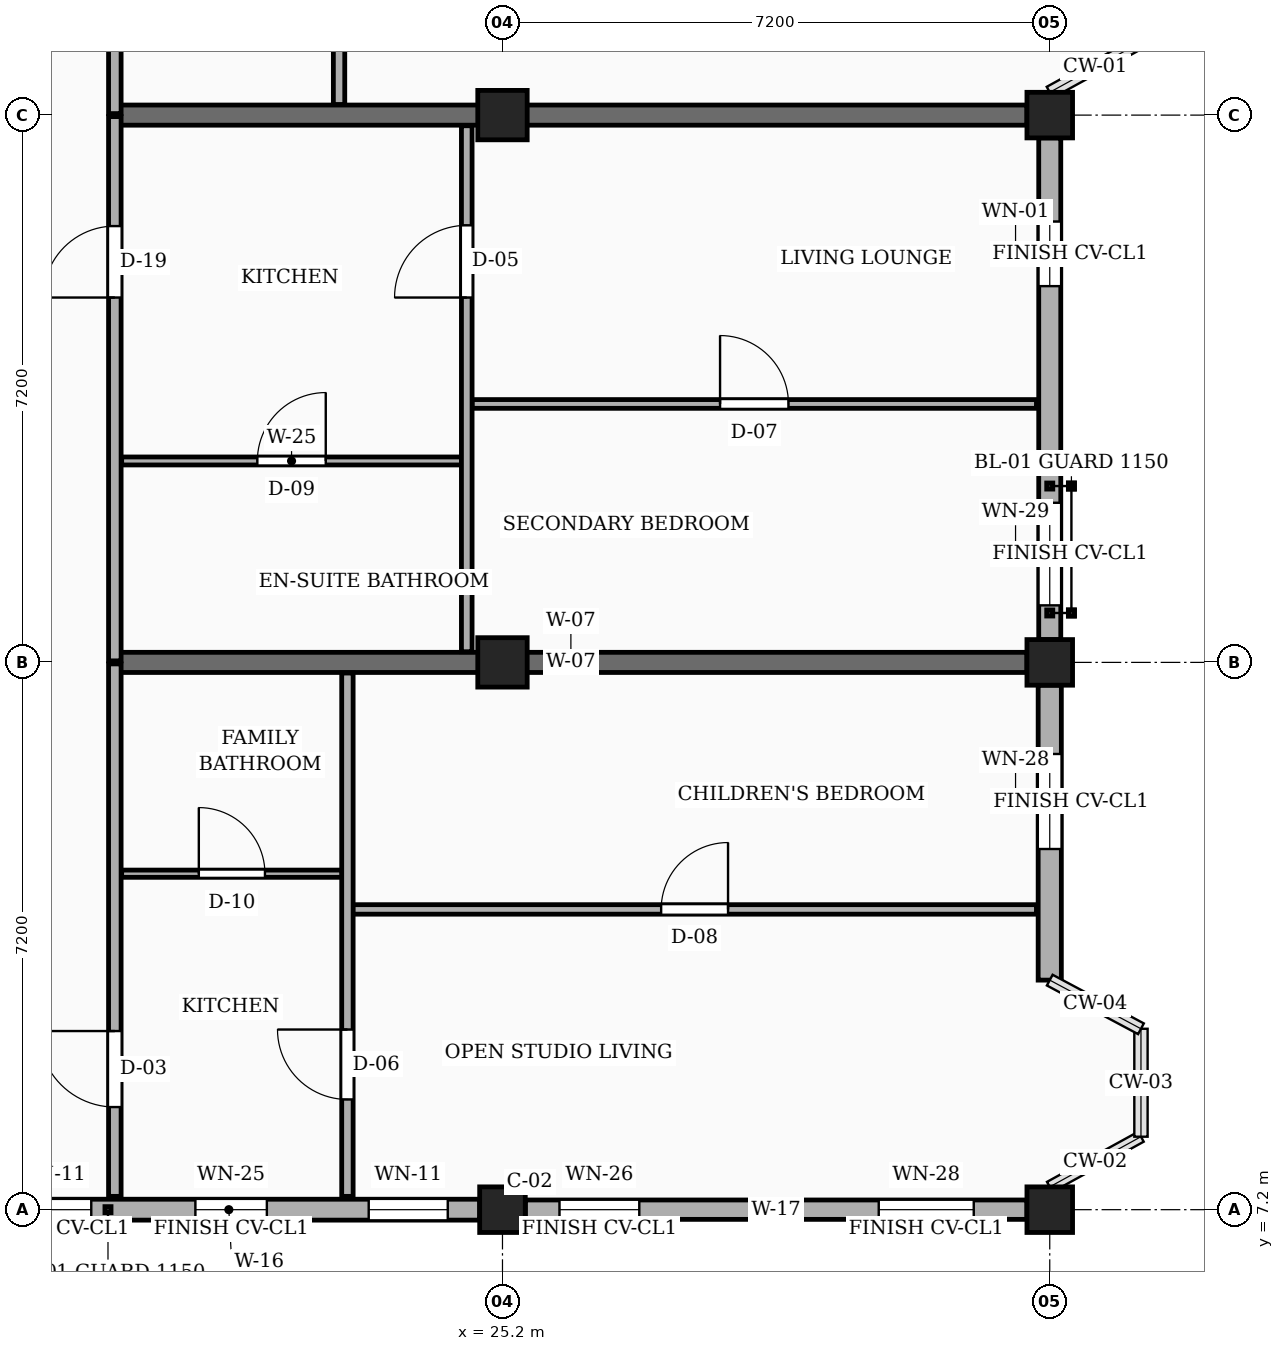
"""IFC4 building model, lengths in metres.
Left out: names, types, materials, properties, quantities, classifications, styles, units other than length and angle.
Written with IfcOpenShell. Run it as: python <this file> out.ifc"""

import sys

from ifc_helpers import new_model, si_unit, direction, frame, frame_2d, origin, origin_2d, place, context, subcontext, project, spatial, rectangle, extrude, element, fill, save


model = new_model("IFC4")
c1 = context("Model", 3, precision=1e-05, world=origin(), true_north=direction((0.0, 1.0)))
c2 = subcontext(c1, "Body", "Model", "MODEL_VIEW")
j1 = project(units=[si_unit("LENGTHUNIT", "METRE"), si_unit("PLANEANGLEUNIT", "RADIAN")], contexts=[c1])
p1 = place(None, origin())
s1 = spatial("IfcSite", under=j1, at=p1, CompositionType="ELEMENT")
p2 = place(p1, origin())
s2 = spatial("IfcBuilding", under=s1, at=p2, CompositionType="ELEMENT")
p3 = place(p2, frame((0.0, 0.0, 7.65)))
s3 = spatial("IfcBuildingStorey", under=s2, at=p3, CompositionType="ELEMENT", Elevation=7.65)
p4 = place(p3, frame((25.2, 7.2, 0.0), z_axis=(0.0, 0.0, 1.0), x_axis=(1.0, 0.0, 0.0)))
e1 = element("IfcColumn", 1, at=p4, inside=s3, PredefinedType="COLUMN", context=c2, shape_type="SweptSolid", body=[
    extrude(rectangle(XDim=0.6, YDim=0.6, at=origin_2d()), origin(), (0.0, 0.0, 1.0), 3.15),
])
for number, where, z_axis, x_axis in (
    (2, (25.2, 14.4, 0.0), (0.0, 0.0, 1.0), (1.0, 0.0, 0.0)),
    (3, (25.2, 21.6, 0.0), (0.0, 0.0, 1.0), (1.0, 0.0, 0.0)),
):
    element("IfcColumn", number, at=place(p3, frame(where, z_axis=z_axis, x_axis=x_axis)), inside=s3, PredefinedType="COLUMN", context=c2, shape_type="SweptSolid", body=[
        extrude(rectangle(XDim=0.65, YDim=0.65, at=origin_2d()), origin(), (0.0, 0.0, 1.0), 3.15),
    ])
for number, where, z_axis, x_axis in (
    (4, (32.4, 7.2, 0.0), (0.0, 0.0, 1.0), (1.0, 0.0, 0.0)),
    (5, (32.4, 14.4, 0.0), (0.0, 0.0, 1.0), (1.0, 0.0, 0.0)),
    (6, (32.4, 21.6, 0.0), (0.0, 0.0, 1.0), (1.0, 0.0, 0.0)),
):
    element("IfcColumn", number, at=place(p3, frame(where, z_axis=z_axis, x_axis=x_axis)), inside=s3, PredefinedType="COLUMN", context=c2, shape_type="SweptSolid", body=[
        extrude(rectangle(XDim=0.6, YDim=0.6, at=origin_2d()), origin(), (0.0, 0.0, 1.0), 3.15),
    ])
for number, where, z_axis, x_axis in (
    (7, (20.1, 14.4, 0.0), (0.0, 0.0, 1.0), (1.0, 0.0, 0.0)),
    (8, (20.1, 21.6, 0.0), (0.0, 0.0, 1.0), (1.0, 0.0, 0.0)),
):
    element("IfcWall", number, at=place(p3, frame(where, z_axis=z_axis, x_axis=x_axis)), inside=s3, PredefinedType="SOLIDWALL", context=c2, shape_type="SweptSolid", body=[
        extrude(rectangle(XDim=12.0, YDim=0.265, at=frame_2d((6.0, 0.0))), origin(), (0.0, 0.0, 1.0), 2.17),
    ])
p5 = place(p3, frame((18.3, 7.2, 0.0), z_axis=(0.0, 0.0, 1.0), x_axis=(1.0, 0.0, 0.0)))
e9 = element("IfcWall", 9, at=p5, inside=s3, PredefinedType="SOLIDWALL", context=c2, shape_type="SweptSolid", body=[
    extrude(rectangle(XDim=6.6, YDim=0.275, at=frame_2d((3.3, 0.0))), origin(), (0.0, 0.0, 1.0), 2.44),
])
p6 = place(p5, frame((0.45, 0.0, 0.78)))
e10 = element("IfcOpeningElement", 10, at=p6, cuts=e9, PredefinedType="OPENING", context=c2, shape_type="SweptSolid", body=[
    extrude(rectangle(XDim=1.04, YDim=1.26, at=frame_2d((0.52, 0.63))), frame((0.0, 0.147, 0.0), z_axis=(0.0, -1.0, 0.0), x_axis=(1.0, 0.0, 0.0)), (0.0, 0.0, 1.0), 0.295),
])
p7 = place(p5, frame((2.86, 0.0, 0.78)))
e11 = element("IfcOpeningElement", 11, at=p7, cuts=e9, PredefinedType="OPENING", context=c2, shape_type="SweptSolid", body=[
    extrude(rectangle(XDim=0.94, YDim=1.44, at=frame_2d((0.47, 0.72))), frame((0.0, 0.147, 0.0), z_axis=(0.0, -1.0, 0.0), x_axis=(1.0, 0.0, 0.0)), (0.0, 0.0, 1.0), 0.295),
])
p8 = place(p5, frame((5.14, 0.0, 0.78)))
e12 = element("IfcOpeningElement", 12, at=p8, cuts=e9, PredefinedType="OPENING", context=c2, shape_type="SweptSolid", body=[
    extrude(rectangle(XDim=1.04, YDim=1.26, at=frame_2d((0.52, 0.63))), frame((0.0, 0.147, 0.0), z_axis=(0.0, -1.0, 0.0), x_axis=(1.0, 0.0, 0.0)), (0.0, 0.0, 1.0), 0.295),
])
p9 = place(p3, frame((25.5, 7.2, 0.0), z_axis=(0.0, 0.0, 1.0), x_axis=(1.0, 0.0, 0.0)))
e13 = element("IfcWall", 13, at=p9, inside=s3, PredefinedType="SOLIDWALL", context=c2, shape_type="SweptSolid", body=[
    extrude(rectangle(XDim=6.6, YDim=0.255, at=frame_2d((3.3, 0.0))), origin(), (0.0, 0.0, 1.0), 2.44),
])
p10 = place(p9, frame((0.45, 0.0, 0.78)))
e14 = element("IfcOpeningElement", 14, at=p10, cuts=e13, PredefinedType="OPENING", context=c2, shape_type="SweptSolid", body=[
    extrude(rectangle(XDim=1.05, YDim=1.44, at=frame_2d((0.525, 0.72))), frame((0.0, 0.137, 0.0), z_axis=(0.0, -1.0, 0.0), x_axis=(1.0, 0.0, 0.0)), (0.0, 0.0, 1.0), 0.275),
])
p11 = place(p9, frame((4.65, 0.0, 0.78)))
e15 = element("IfcOpeningElement", 15, at=p11, cuts=e13, PredefinedType="OPENING", context=c2, shape_type="SweptSolid", body=[
    extrude(rectangle(XDim=1.25, YDim=1.44, at=frame_2d((0.625, 0.72))), frame((0.0, 0.137, 0.0), z_axis=(0.0, -1.0, 0.0), x_axis=(1.0, 0.0, 0.0)), (0.0, 0.0, 1.0), 0.275),
])
p12 = place(p3, frame((32.4, 10.22, 0.0), z_axis=(0.0, 0.0, 1.0), x_axis=(0.0, 1.0, 0.0)))
e16 = element("IfcWall", 16, at=p12, inside=s3, PredefinedType="SOLIDWALL", context=c2, shape_type="SweptSolid", body=[
    extrude(rectangle(XDim=3.88, YDim=0.305, at=frame_2d((1.94, 0.0))), origin(), (0.0, 0.0, 1.0), 2.44),
])
p13 = place(p12, frame((1.725, 0.0, 0.78)))
e17 = element("IfcOpeningElement", 17, at=p13, cuts=e16, PredefinedType="OPENING", context=c2, shape_type="SweptSolid", body=[
    extrude(rectangle(XDim=1.25, YDim=1.44, at=frame_2d((0.625, 0.72))), frame((0.0, 0.163, 0.0), z_axis=(0.0, -1.0, 0.0), x_axis=(1.0, 0.0, 0.0)), (0.0, 0.0, 1.0), 0.325),
])
p14 = place(p3, frame((32.4, 14.7, 0.0), z_axis=(0.0, 0.0, 1.0), x_axis=(0.0, 1.0, 0.0)))
e18 = element("IfcWall", 18, at=p14, inside=s3, PredefinedType="SOLIDWALL", context=c2, shape_type="SweptSolid", body=[
    extrude(rectangle(XDim=6.6, YDim=0.29, at=frame_2d((3.3, 0.0))), origin(), (0.0, 0.0, 1.0), 2.44),
])
p15 = place(p14, frame((0.45, 0.0, 0.78)))
e19 = element("IfcOpeningElement", 19, at=p15, cuts=e18, PredefinedType="OPENING", context=c2, shape_type="SweptSolid", body=[
    extrude(rectangle(XDim=1.35, YDim=1.44, at=frame_2d((0.675, 0.72))), frame((0.0, 0.155, 0.0), z_axis=(0.0, -1.0, 0.0), x_axis=(1.0, 0.0, 0.0)), (0.0, 0.0, 1.0), 0.31),
])
p16 = place(p14, frame((4.65, 0.0, 0.78)))
e20 = element("IfcOpeningElement", 20, at=p16, cuts=e18, PredefinedType="OPENING", context=c2, shape_type="SweptSolid", body=[
    extrude(rectangle(XDim=0.85, YDim=1.15, at=frame_2d((0.425, 0.575))), frame((0.0, 0.155, 0.0), z_axis=(0.0, -1.0, 0.0), x_axis=(1.0, 0.0, 0.0)), (0.0, 0.0, 1.0), 0.31),
])
p17 = place(p3, frame((20.1, 7.375, 0.0), z_axis=(0.0, 0.0, 1.0), x_axis=(0.0, 1.0, 0.0)))
e21 = element("IfcWall", 21, at=p17, inside=s3, PredefinedType="PARTITIONING", context=c2, shape_type="SweptSolid", body=[
    extrude(rectangle(XDim=7.005, YDim=0.165, at=frame_2d((3.502, 0.0))), origin(), (0.0, 0.0, 1.0), 2.305),
])
p18 = place(p17, frame((1.175, 0.0, 0.0)))
e22 = element("IfcOpeningElement", 22, at=p18, cuts=e21, PredefinedType="OPENING", context=c2, shape_type="SweptSolid", body=[
    extrude(rectangle(XDim=1.0, YDim=2.15, at=frame_2d((0.5, 1.075))), frame((0.0, 0.093, 0.0), z_axis=(0.0, -1.0, 0.0), x_axis=(1.0, 0.0, 0.0)), (0.0, 0.0, 1.0), 0.185),
])
p19 = place(p3, frame((20.1, 14.42, 0.0), z_axis=(0.0, 0.0, 1.0), x_axis=(0.0, 1.0, 0.0)))
e23 = element("IfcWall", 23, at=p19, inside=s3, PredefinedType="PARTITIONING", context=c2, shape_type="SweptSolid", body=[
    extrude(rectangle(XDim=7.16, YDim=0.165, at=frame_2d((3.58, 0.0))), origin(), (0.0, 0.0, 1.0), 2.305),
])
p20 = place(p19, frame((4.78, 0.0, 0.0)))
e24 = element("IfcOpeningElement", 24, at=p20, cuts=e23, PredefinedType="OPENING", context=c2, shape_type="SweptSolid", body=[
    extrude(rectangle(XDim=0.94, YDim=2.12, at=frame_2d((0.47, 1.06))), frame((0.0, 0.093, 0.0), z_axis=(0.0, -1.0, 0.0), x_axis=(1.0, 0.0, 0.0)), (0.0, 0.0, 1.0), 0.185),
])
p21 = place(p3, frame((20.1, 21.62, 0.0), z_axis=(0.0, 0.0, 1.0), x_axis=(0.0, 1.0, 0.0)))
e25 = element("IfcWall", 25, at=p21, inside=s3, PredefinedType="PARTITIONING", context=c2, shape_type="SweptSolid", body=[
    extrude(rectangle(XDim=7.16, YDim=0.165, at=frame_2d((3.58, 0.0))), origin(), (0.0, 0.0, 1.0), 2.305),
])
p22 = place(p21, frame((1.33, 0.0, 0.0)))
e26 = element("IfcOpeningElement", 26, at=p22, cuts=e25, PredefinedType="OPENING", context=c2, shape_type="SweptSolid", body=[
    extrude(rectangle(XDim=1.14, YDim=2.18, at=frame_2d((0.57, 1.09))), frame((0.0, 0.093, 0.0), z_axis=(0.0, -1.0, 0.0), x_axis=(1.0, 0.0, 0.0)), (0.0, 0.0, 1.0), 0.185),
])
p23 = place(p3, frame((23.23, 11.15, 0.0), z_axis=(0.0, 0.0, 1.0), x_axis=(1.0, 0.0, 0.0)))
e27 = element("IfcWall", 27, at=p23, inside=s3, PredefinedType="PARTITIONING", context=c2, shape_type="SweptSolid", body=[
    extrude(rectangle(XDim=8.995, YDim=0.125, at=frame_2d((4.498, 0.0))), origin(), (0.0, 0.0, 1.0), 2.305),
])
p24 = place(p23, frame((4.058, 0.0, 0.0)))
e28 = element("IfcOpeningElement", 28, at=p24, cuts=e27, PredefinedType="OPENING", context=c2, shape_type="SweptSolid", body=[
    extrude(rectangle(XDim=0.88, YDim=2.08, at=frame_2d((0.44, 1.04))), frame((0.0, 0.073, 0.0), z_axis=(0.0, -1.0, 0.0), x_axis=(1.0, 0.0, 0.0)), (0.0, 0.0, 1.0), 0.145),
])
p25 = place(p3, frame((20.19, 11.62, 0.0), z_axis=(0.0, 0.0, 1.0), x_axis=(1.0, 0.0, 0.0)))
e29 = element("IfcWall", 29, at=p25, inside=s3, PredefinedType="PARTITIONING", context=c2, shape_type="SweptSolid", body=[
    extrude(rectangle(XDim=2.9, YDim=0.095, at=frame_2d((1.45, 0.0))), origin(), (0.0, 0.0, 1.0), 2.305),
])
p26 = place(p25, frame((1.015, 0.0, 0.0)))
e30 = element("IfcOpeningElement", 30, at=p26, cuts=e29, PredefinedType="OPENING", context=c2, shape_type="SweptSolid", body=[
    extrude(rectangle(XDim=0.87, YDim=2.05, at=frame_2d((0.435, 1.025))), frame((0.0, 0.058, 0.0), z_axis=(0.0, -1.0, 0.0), x_axis=(1.0, 0.0, 0.0)), (0.0, 0.0, 1.0), 0.115),
])
p27 = place(p3, frame((23.16, 7.375, 0.0), z_axis=(0.0, 0.0, 1.0), x_axis=(0.0, 1.0, 0.0)))
e31 = element("IfcWall", 31, at=p27, inside=s3, PredefinedType="PARTITIONING", context=c2, shape_type="SweptSolid", body=[
    extrude(rectangle(XDim=6.885, YDim=0.15, at=frame_2d((3.442, 0.0))), origin(), (0.0, 0.0, 1.0), 2.305),
])
p28 = place(p27, frame((1.275, 0.0, 0.0)))
e32 = element("IfcOpeningElement", 32, at=p28, cuts=e31, PredefinedType="OPENING", context=c2, shape_type="SweptSolid", body=[
    extrude(rectangle(XDim=0.92, YDim=2.1, at=frame_2d((0.46, 1.05))), frame((0.0, 0.085, 0.0), z_axis=(0.0, -1.0, 0.0), x_axis=(1.0, 0.0, 0.0)), (0.0, 0.0, 1.0), 0.17),
])
p29 = place(p3, frame((24.8, 17.8, 0.0), z_axis=(0.0, 0.0, 1.0), x_axis=(1.0, 0.0, 0.0)))
e33 = element("IfcWall", 33, at=p29, inside=s3, PredefinedType="PARTITIONING", context=c2, shape_type="SweptSolid", body=[
    extrude(rectangle(XDim=7.425, YDim=0.115, at=frame_2d((3.712, 0.0))), origin(), (0.0, 0.0, 1.0), 2.305),
])
p30 = place(p29, frame((3.262, 0.0, 0.0)))
e34 = element("IfcOpeningElement", 34, at=p30, cuts=e33, PredefinedType="OPENING", context=c2, shape_type="SweptSolid", body=[
    extrude(rectangle(XDim=0.9, YDim=2.1, at=frame_2d((0.45, 1.05))), frame((0.0, 0.067, 0.0), z_axis=(0.0, -1.0, 0.0), x_axis=(1.0, 0.0, 0.0)), (0.0, 0.0, 1.0), 0.135),
])
p31 = place(p3, frame((20.19, 17.05, 0.0), z_axis=(0.0, 0.0, 1.0), x_axis=(1.0, 0.0, 0.0)))
e35 = element("IfcWall", 35, at=p31, inside=s3, PredefinedType="PARTITIONING", context=c2, shape_type="SweptSolid", body=[
    extrude(rectangle(XDim=4.47, YDim=0.105, at=frame_2d((2.235, 0.0))), origin(), (0.0, 0.0, 1.0), 2.305),
])
p32 = place(p31, frame((1.785, 0.0, 0.0)))
e36 = element("IfcOpeningElement", 36, at=p32, cuts=e35, PredefinedType="OPENING", context=c2, shape_type="SweptSolid", body=[
    extrude(rectangle(XDim=0.9, YDim=2.05, at=frame_2d((0.45, 1.025))), frame((0.0, 0.062, 0.0), z_axis=(0.0, -1.0, 0.0), x_axis=(1.0, 0.0, 0.0)), (0.0, 0.0, 1.0), 0.125),
])
p33 = place(p3, frame((24.73, 14.54, 0.0), z_axis=(0.0, 0.0, 1.0), x_axis=(0.0, 1.0, 0.0)))
e37 = element("IfcWall", 37, at=p33, inside=s3, PredefinedType="PARTITIONING", context=c2, shape_type="SweptSolid", body=[
    extrude(rectangle(XDim=6.92, YDim=0.14, at=frame_2d((3.46, 0.0))), origin(), (0.0, 0.0, 1.0), 2.305),
])
p34 = place(p33, frame((4.66, 0.0, 0.0)))
e38 = element("IfcOpeningElement", 38, at=p34, cuts=e37, PredefinedType="OPENING", context=c2, shape_type="SweptSolid", body=[
    extrude(rectangle(XDim=0.95, YDim=2.1, at=frame_2d((0.475, 1.05))), frame((0.0, 0.08, 0.0), z_axis=(0.0, -1.0, 0.0), x_axis=(1.0, 0.0, 0.0)), (0.0, 0.0, 1.0), 0.16),
])
p35 = place(p3, frame((23.05, 21.74, 0.0), z_axis=(0.0, 0.0, 1.0), x_axis=(0.0, 1.0, 0.0)))
e39 = element("IfcWall", 39, at=p35, inside=s3, PredefinedType="PARTITIONING", context=c2, shape_type="SweptSolid", body=[
    extrude(rectangle(XDim=6.92, YDim=0.15, at=frame_2d((3.46, 0.0))), origin(), (0.0, 0.0, 1.0), 2.305),
])
p36 = place(p35, frame((1.31, 0.0, 0.0)))
e40 = element("IfcOpeningElement", 40, at=p36, cuts=e39, PredefinedType="OPENING", context=c2, shape_type="SweptSolid", body=[
    extrude(rectangle(XDim=0.95, YDim=2.1, at=frame_2d((0.475, 1.05))), frame((0.0, 0.085, 0.0), z_axis=(0.0, -1.0, 0.0), x_axis=(1.0, 0.0, 0.0)), (0.0, 0.0, 1.0), 0.17),
])
p37 = place(p6, origin())
e41 = element("IfcWindow", 41, at=p37, inside=s3, PartitioningType="SINGLE_PANEL", PredefinedType="WINDOW", context=c2, shape_type="SweptSolid", body=[
    extrude(rectangle(XDim=1.04, YDim=1.26, at=frame_2d((0.52, 0.63))), frame((0.0, 0.03, 0.0), z_axis=(0.0, -1.0, 0.0), x_axis=(1.0, 0.0, 0.0)), (0.0, 0.0, 1.0), 0.06),
])
fill(e10, e41)
p38 = place(p7, origin())
e42 = element("IfcWindow", 42, at=p38, inside=s3, PartitioningType="SINGLE_PANEL", PredefinedType="WINDOW", context=c2, shape_type="SweptSolid", body=[
    extrude(rectangle(XDim=0.94, YDim=1.44, at=frame_2d((0.47, 0.72))), frame((0.0, 0.03, 0.0), z_axis=(0.0, -1.0, 0.0), x_axis=(1.0, 0.0, 0.0)), (0.0, 0.0, 1.0), 0.06),
])
fill(e11, e42)
p39 = place(p8, origin())
e43 = element("IfcWindow", 43, at=p39, inside=s3, PartitioningType="SINGLE_PANEL", PredefinedType="WINDOW", context=c2, shape_type="SweptSolid", body=[
    extrude(rectangle(XDim=1.04, YDim=1.26, at=frame_2d((0.52, 0.63))), frame((0.0, 0.03, 0.0), z_axis=(0.0, -1.0, 0.0), x_axis=(1.0, 0.0, 0.0)), (0.0, 0.0, 1.0), 0.06),
])
fill(e12, e43)
p40 = place(p10, origin())
e44 = element("IfcWindow", 44, at=p40, inside=s3, PartitioningType="SINGLE_PANEL", PredefinedType="WINDOW", context=c2, shape_type="SweptSolid", body=[
    extrude(rectangle(XDim=1.05, YDim=1.44, at=frame_2d((0.525, 0.72))), frame((0.0, 0.03, 0.0), z_axis=(0.0, -1.0, 0.0), x_axis=(1.0, 0.0, 0.0)), (0.0, 0.0, 1.0), 0.06),
])
fill(e14, e44)
p41 = place(p11, origin())
e45 = element("IfcWindow", 45, at=p41, inside=s3, PartitioningType="SINGLE_PANEL", PredefinedType="WINDOW", context=c2, shape_type="SweptSolid", body=[
    extrude(rectangle(XDim=1.25, YDim=1.44, at=frame_2d((0.625, 0.72))), frame((0.0, 0.03, 0.0), z_axis=(0.0, -1.0, 0.0), x_axis=(1.0, 0.0, 0.0)), (0.0, 0.0, 1.0), 0.06),
])
fill(e15, e45)
p42 = place(p13, origin())
e46 = element("IfcWindow", 46, at=p42, inside=s3, PartitioningType="SINGLE_PANEL", PredefinedType="WINDOW", context=c2, shape_type="SweptSolid", body=[
    extrude(rectangle(XDim=1.25, YDim=1.44, at=frame_2d((0.625, 0.72))), frame((0.0, 0.03, 0.0), z_axis=(0.0, -1.0, 0.0), x_axis=(1.0, 0.0, 0.0)), (0.0, 0.0, 1.0), 0.06),
])
fill(e17, e46)
p43 = place(p15, origin())
e47 = element("IfcWindow", 47, at=p43, inside=s3, PartitioningType="SINGLE_PANEL", PredefinedType="WINDOW", context=c2, shape_type="SweptSolid", body=[
    extrude(rectangle(XDim=1.35, YDim=1.44, at=frame_2d((0.675, 0.72))), frame((0.0, 0.03, 0.0), z_axis=(0.0, -1.0, 0.0), x_axis=(1.0, 0.0, 0.0)), (0.0, 0.0, 1.0), 0.06),
])
fill(e19, e47)
p44 = place(p16, origin())
e48 = element("IfcWindow", 48, at=p44, inside=s3, PartitioningType="SINGLE_PANEL", PredefinedType="WINDOW", context=c2, shape_type="SweptSolid", body=[
    extrude(rectangle(XDim=0.85, YDim=1.15, at=frame_2d((0.425, 0.575))), frame((0.0, 0.03, 0.0), z_axis=(0.0, -1.0, 0.0), x_axis=(1.0, 0.0, 0.0)), (0.0, 0.0, 1.0), 0.06),
])
fill(e20, e48)
p45 = place(p18, origin())
e49 = element("IfcDoor", 49, at=p45, inside=s3, OperationType="SINGLE_SWING_RIGHT", PredefinedType="DOOR", context=c2, shape_type="SweptSolid", body=[
    extrude(rectangle(XDim=1.0, YDim=2.15, at=frame_2d((0.5, 1.075))), frame((0.0, 0.025, 0.0), z_axis=(0.0, -1.0, 0.0), x_axis=(1.0, 0.0, 0.0)), (0.0, 0.0, 1.0), 0.05),
])
fill(e22, e49)
p46 = place(p20, origin())
e50 = element("IfcDoor", 50, at=p46, inside=s3, OperationType="SINGLE_SWING_LEFT", PredefinedType="DOOR", context=c2, shape_type="SweptSolid", body=[
    extrude(rectangle(XDim=0.94, YDim=2.12, at=frame_2d((0.47, 1.06))), frame((0.0, 0.025, 0.0), z_axis=(0.0, -1.0, 0.0), x_axis=(1.0, 0.0, 0.0)), (0.0, 0.0, 1.0), 0.05),
])
fill(e24, e50)
p47 = place(p24, origin())
e51 = element("IfcDoor", 51, at=p47, inside=s3, OperationType="SINGLE_SWING_RIGHT", PredefinedType="DOOR", context=c2, shape_type="SweptSolid", body=[
    extrude(rectangle(XDim=0.88, YDim=2.08, at=frame_2d((0.44, 1.04))), frame((0.0, 0.025, 0.0), z_axis=(0.0, -1.0, 0.0), x_axis=(1.0, 0.0, 0.0)), (0.0, 0.0, 1.0), 0.05),
])
fill(e28, e51)
p48 = place(p26, origin())
e52 = element("IfcDoor", 52, at=p48, inside=s3, OperationType="SINGLE_SWING_LEFT", PredefinedType="DOOR", context=c2, shape_type="SweptSolid", body=[
    extrude(rectangle(XDim=0.87, YDim=2.05, at=frame_2d((0.435, 1.025))), frame((0.0, 0.025, 0.0), z_axis=(0.0, -1.0, 0.0), x_axis=(1.0, 0.0, 0.0)), (0.0, 0.0, 1.0), 0.05),
])
fill(e30, e52)
p49 = place(p28, origin())
e53 = element("IfcDoor", 53, at=p49, inside=s3, OperationType="SINGLE_SWING_RIGHT", PredefinedType="DOOR", context=c2, shape_type="SweptSolid", body=[
    extrude(rectangle(XDim=0.92, YDim=2.1, at=frame_2d((0.46, 1.05))), frame((0.0, 0.025, 0.0), z_axis=(0.0, -1.0, 0.0), x_axis=(1.0, 0.0, 0.0)), (0.0, 0.0, 1.0), 0.05),
])
fill(e32, e53)
p50 = place(p30, origin())
e54 = element("IfcDoor", 54, at=p50, inside=s3, OperationType="SINGLE_SWING_LEFT", PredefinedType="DOOR", context=c2, shape_type="SweptSolid", body=[
    extrude(rectangle(XDim=0.9, YDim=2.1, at=frame_2d((0.45, 1.05))), frame((0.0, 0.025, 0.0), z_axis=(0.0, -1.0, 0.0), x_axis=(1.0, 0.0, 0.0)), (0.0, 0.0, 1.0), 0.05),
])
fill(e34, e54)
p51 = place(p32, origin())
e55 = element("IfcDoor", 55, at=p51, inside=s3, OperationType="SINGLE_SWING_RIGHT", PredefinedType="DOOR", context=c2, shape_type="SweptSolid", body=[
    extrude(rectangle(XDim=0.9, YDim=2.05, at=frame_2d((0.45, 1.025))), frame((0.0, 0.025, 0.0), z_axis=(0.0, -1.0, 0.0), x_axis=(1.0, 0.0, 0.0)), (0.0, 0.0, 1.0), 0.05),
])
fill(e36, e55)
p52 = place(p34, origin())
e56 = element("IfcDoor", 56, at=p52, inside=s3, OperationType="SINGLE_SWING_LEFT", PredefinedType="DOOR", context=c2, shape_type="SweptSolid", body=[
    extrude(rectangle(XDim=0.95, YDim=2.1, at=frame_2d((0.475, 1.05))), frame((0.0, 0.025, 0.0), z_axis=(0.0, -1.0, 0.0), x_axis=(1.0, 0.0, 0.0)), (0.0, 0.0, 1.0), 0.05),
])
fill(e38, e56)
save(model, sys.argv[1])
